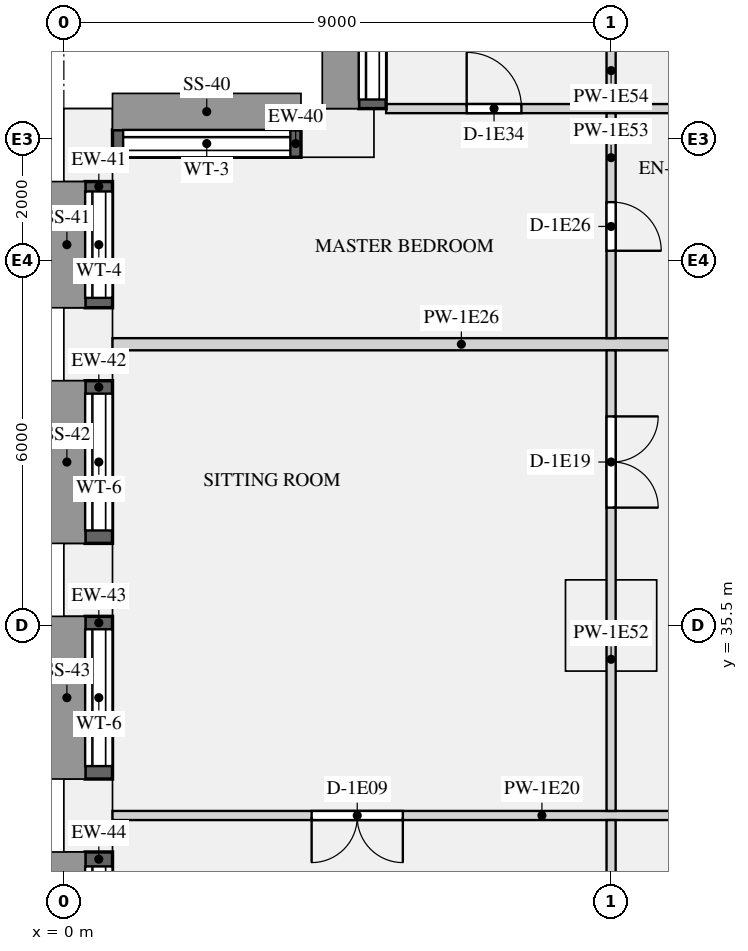
"""IFC4 building model, lengths in metres.
Left out: names, types, materials, properties, quantities, classifications, styles, units other than length and angle.
Written with IfcOpenShell. Run it as: python <this file> out.ifc"""

import sys

from ifc_helpers import new_model, si_unit, direction, frame, frame_2d, origin, origin_2d, place, context, subcontext, project, spatial, rectangle, extrude, element, fill, save


model = new_model("IFC4")
c1 = context("Model", 3, precision=1e-05, world=origin(), true_north=direction((0.0, 1.0)))
c2 = subcontext(c1, "Body", "Model", "MODEL_VIEW")
j1 = project(units=[si_unit("LENGTHUNIT", "METRE"), si_unit("PLANEANGLEUNIT", "RADIAN")], contexts=[c1])
p1 = place(None, origin())
s1 = spatial("IfcSite", under=j1, at=p1, CompositionType="ELEMENT")
p2 = place(p1, origin())
s2 = spatial("IfcBuilding", under=s1, at=p2, CompositionType="ELEMENT")
p3 = place(p2, frame((0.0, 0.0, 54.15)))
s3 = spatial("IfcBuildingStorey", under=s2, at=p3, CompositionType="ELEMENT", Elevation=54.15)
for number, where, z_axis, x_axis in (
    (1, (4.5, 43.6, 0.0), (0.0, 0.0, 1.0), (-1.0, 0.0, 0.0)),
    (2, (0.4, 43.4, 0.0), (0.0, 0.0, 1.0), (0.0, -1.0, 0.0)),
    (3, (0.4, 40.125, 0.0), (0.0, 0.0, 1.0), (0.0, -1.0, 0.0)),
    (4, (0.4, 36.25, 0.0), (0.0, 0.0, 1.0), (0.0, -1.0, 0.0)),
    (5, (0.4, 32.375, 0.0), (0.0, 0.0, 1.0), (0.0, -1.0, 0.0)),
):
    element("IfcColumn", number, at=place(p3, frame(where, z_axis=z_axis, x_axis=x_axis)), inside=s3, PredefinedType="USERDEFINED", context=c2, shape_type="SweptSolid", body=[
        extrude(rectangle(XDim=1.2, YDim=0.8, at=origin_2d()), origin(), (0.0, 0.0, 1.0), 3.15),
    ])
p4 = place(p3, frame((9.0, 35.5, 0.0), z_axis=(0.0, 0.0, 1.0), x_axis=(1.0, 0.0, 0.0)))
e6 = element("IfcColumn", 6, at=p4, inside=s3, PredefinedType="COLUMN", context=c2, shape_type="SweptSolid", body=[
    extrude(rectangle(XDim=1.5, YDim=1.5, at=origin_2d()), origin(), (0.0, 0.0, 1.0), 3.15),
])
p5 = place(p3, frame((5.075, 47.3, 0.9), z_axis=(0.0, 0.0, 1.0), x_axis=(0.0, -1.0, 0.0)))
e7 = element("IfcWall", 7, at=p5, inside=s3, PredefinedType="SOLIDWALL", context=c2, shape_type="SweptSolid", body=[
    extrude(rectangle(XDim=3.3, YDim=0.45, at=frame_2d((1.65, 0.0))), origin(), (0.0, 0.0, 1.0), 1.93),
])
p6 = place(p5, frame((0.15, 0.0, 0.15)))
e8 = element("IfcOpeningElement", 8, at=p6, cuts=e7, PredefinedType="OPENING", context=c2, shape_type="SweptSolid", body=[
    extrude(rectangle(XDim=3.0, YDim=1.5, at=frame_2d((1.5, 0.75))), frame((0.0, 0.235, 0.0), z_axis=(0.0, -1.0, 0.0), x_axis=(1.0, 0.0, 0.0)), (0.0, 0.0, 1.0), 0.47),
])
p7 = place(p3, frame((3.9, 43.425, 0.9), z_axis=(0.0, 0.0, 1.0), x_axis=(-1.0, 0.0, 0.0)))
e9 = element("IfcWall", 9, at=p7, inside=s3, PredefinedType="SOLIDWALL", context=c2, shape_type="SweptSolid", body=[
    extrude(rectangle(XDim=3.1, YDim=0.45, at=frame_2d((1.55, 0.0))), origin(), (0.0, 0.0, 1.0), 1.93),
])
p8 = place(p7, frame((0.175, 0.0, 0.15)))
e10 = element("IfcOpeningElement", 10, at=p8, cuts=e9, PredefinedType="OPENING", context=c2, shape_type="SweptSolid", body=[
    extrude(rectangle(XDim=2.75, YDim=1.5, at=frame_2d((1.375, 0.75))), frame((0.0, 0.235, 0.0), z_axis=(0.0, -1.0, 0.0), x_axis=(1.0, 0.0, 0.0)), (0.0, 0.0, 1.0), 0.47),
])
p9 = place(p3, frame((0.575, 42.8, 0.9), z_axis=(0.0, 0.0, 1.0), x_axis=(0.0, -1.0, 0.0)))
e11 = element("IfcWall", 11, at=p9, inside=s3, PredefinedType="SOLIDWALL", context=c2, shape_type="SweptSolid", body=[
    extrude(rectangle(XDim=2.075, YDim=0.45, at=frame_2d((1.038, 0.0))), origin(), (0.0, 0.0, 1.0), 1.93),
])
p10 = place(p9, frame((0.163, 0.0, 0.15)))
e12 = element("IfcOpeningElement", 12, at=p10, cuts=e11, PredefinedType="OPENING", context=c2, shape_type="SweptSolid", body=[
    extrude(rectangle(XDim=1.75, YDim=1.5, at=frame_2d((0.875, 0.75))), frame((0.0, 0.235, 0.0), z_axis=(0.0, -1.0, 0.0), x_axis=(1.0, 0.0, 0.0)), (0.0, 0.0, 1.0), 0.47),
])
p11 = place(p3, frame((0.575, 39.525, 0.9), z_axis=(0.0, 0.0, 1.0), x_axis=(0.0, -1.0, 0.0)))
e13 = element("IfcWall", 13, at=p11, inside=s3, PredefinedType="SOLIDWALL", context=c2, shape_type="SweptSolid", body=[
    extrude(rectangle(XDim=2.675, YDim=0.45, at=frame_2d((1.337, 0.0))), origin(), (0.0, 0.0, 1.0), 1.93),
])
p12 = place(p11, frame((0.212, 0.0, 0.15)))
e14 = element("IfcOpeningElement", 14, at=p12, cuts=e13, PredefinedType="OPENING", context=c2, shape_type="SweptSolid", body=[
    extrude(rectangle(XDim=2.25, YDim=1.5, at=frame_2d((1.125, 0.75))), frame((0.0, 0.235, 0.0), z_axis=(0.0, -1.0, 0.0), x_axis=(1.0, 0.0, 0.0)), (0.0, 0.0, 1.0), 0.47),
])
p13 = place(p3, frame((0.575, 35.65, 0.9), z_axis=(0.0, 0.0, 1.0), x_axis=(0.0, -1.0, 0.0)))
e15 = element("IfcWall", 15, at=p13, inside=s3, PredefinedType="SOLIDWALL", context=c2, shape_type="SweptSolid", body=[
    extrude(rectangle(XDim=2.675, YDim=0.45, at=frame_2d((1.337, 0.0))), origin(), (0.0, 0.0, 1.0), 1.93),
])
p14 = place(p13, frame((0.212, 0.0, 0.15)))
e16 = element("IfcOpeningElement", 16, at=p14, cuts=e15, PredefinedType="OPENING", context=c2, shape_type="SweptSolid", body=[
    extrude(rectangle(XDim=2.25, YDim=1.5, at=frame_2d((1.125, 0.75))), frame((0.0, 0.235, 0.0), z_axis=(0.0, -1.0, 0.0), x_axis=(1.0, 0.0, 0.0)), (0.0, 0.0, 1.0), 0.47),
])
p15 = place(p3, frame((0.575, 31.775, 0.9), z_axis=(0.0, 0.0, 1.0), x_axis=(0.0, -1.0, 0.0)))
e17 = element("IfcWall", 17, at=p15, inside=s3, PredefinedType="SOLIDWALL", context=c2, shape_type="SweptSolid", body=[
    extrude(rectangle(XDim=2.475, YDim=0.45, at=frame_2d((1.237, 0.0))), origin(), (0.0, 0.0, 1.0), 1.93),
])
p16 = place(p15, frame((0.238, 0.0, 0.15)))
e18 = element("IfcOpeningElement", 18, at=p16, cuts=e17, PredefinedType="OPENING", context=c2, shape_type="SweptSolid", body=[
    extrude(rectangle(XDim=2.0, YDim=1.5, at=frame_2d((1.0, 0.75))), frame((0.0, 0.235, 0.0), z_axis=(0.0, -1.0, 0.0), x_axis=(1.0, 0.0, 0.0)), (0.0, 0.0, 1.0), 0.47),
])
p17 = place(p3, frame((0.8, 32.375, 0.0), z_axis=(0.0, 0.0, 1.0), x_axis=(1.0, 0.0, 0.0)))
e19 = element("IfcWall", 19, at=p17, inside=s3, PredefinedType="PARTITIONING", context=c2, shape_type="SweptSolid", body=[
    extrude(rectangle(XDim=11.4, YDim=0.15, at=frame_2d((5.7, 0.0))), origin(), (0.0, 0.0, 1.0), 2.83),
])
p18 = place(p17, frame((3.275, 0.0, 0.0)))
e20 = element("IfcOpeningElement", 20, at=p18, cuts=e19, PredefinedType="OPENING", context=c2, shape_type="SweptSolid", body=[
    extrude(rectangle(XDim=1.5, YDim=2.1, at=frame_2d((0.75, 1.05))), frame((0.0, 0.085, 0.0), z_axis=(0.0, -1.0, 0.0), x_axis=(1.0, 0.0, 0.0)), (0.0, 0.0, 1.0), 0.17),
])
p19 = place(p17, frame((9.35, 0.0, 0.0)))
e21 = element("IfcOpeningElement", 21, at=p19, cuts=e19, PredefinedType="OPENING", context=c2, shape_type="SweptSolid", body=[
    extrude(rectangle(XDim=0.9, YDim=2.1, at=frame_2d((0.45, 1.05))), frame((0.0, 0.085, 0.0), z_axis=(0.0, -1.0, 0.0), x_axis=(1.0, 0.0, 0.0)), (0.0, 0.0, 1.0), 0.17),
])
p20 = place(p3, frame((0.8, 40.125, 0.0), z_axis=(0.0, 0.0, 1.0), x_axis=(1.0, 0.0, 0.0)))
e22 = element("IfcWall", 22, at=p20, inside=s3, PredefinedType="PARTITIONING", context=c2, shape_type="SweptSolid", body=[
    extrude(rectangle(XDim=11.475, YDim=0.2, at=frame_2d((5.737, 0.0))), origin(), (0.0, 0.0, 1.0), 2.83),
])
p21 = place(p3, frame((5.3, 44.0, 0.0), z_axis=(0.0, 0.0, 1.0), x_axis=(1.0, 0.0, 0.0)))
e23 = element("IfcWall", 23, at=p21, inside=s3, PredefinedType="PARTITIONING", context=c2, shape_type="SweptSolid", body=[
    extrude(rectangle(XDim=27.775, YDim=0.15, at=frame_2d((13.887, 0.0))), origin(), (0.0, 0.0, 1.0), 2.83),
])
p22 = place(p21, frame((14.5, 0.0, 0.0)))
e24 = element("IfcOpeningElement", 24, at=p22, cuts=e23, PredefinedType="OPENING", context=c2, shape_type="SweptSolid", body=[
    extrude(rectangle(XDim=0.9, YDim=2.1, at=frame_2d((0.45, 1.05))), frame((0.0, 0.085, 0.0), z_axis=(0.0, -1.0, 0.0), x_axis=(1.0, 0.0, 0.0)), (0.0, 0.0, 1.0), 0.17),
])
p23 = place(p21, frame((19.0, 0.0, 0.0)))
e25 = element("IfcOpeningElement", 25, at=p23, cuts=e23, PredefinedType="OPENING", context=c2, shape_type="SweptSolid", body=[
    extrude(rectangle(XDim=0.9, YDim=2.1, at=frame_2d((0.45, 1.05))), frame((0.0, 0.085, 0.0), z_axis=(0.0, -1.0, 0.0), x_axis=(1.0, 0.0, 0.0)), (0.0, 0.0, 1.0), 0.17),
])
p24 = place(p21, frame((9.35, 0.0, 0.0)))
e26 = element("IfcOpeningElement", 26, at=p24, cuts=e23, PredefinedType="OPENING", context=c2, shape_type="SweptSolid", body=[
    extrude(rectangle(XDim=0.9, YDim=2.1, at=frame_2d((0.45, 1.05))), frame((0.0, 0.085, 0.0), z_axis=(0.0, -1.0, 0.0), x_axis=(1.0, 0.0, 0.0)), (0.0, 0.0, 1.0), 0.17),
])
p25 = place(p21, frame((23.5, 0.0, 0.0)))
e27 = element("IfcOpeningElement", 27, at=p25, cuts=e23, PredefinedType="OPENING", context=c2, shape_type="SweptSolid", body=[
    extrude(rectangle(XDim=0.9, YDim=2.1, at=frame_2d((0.45, 1.05))), frame((0.0, 0.085, 0.0), z_axis=(0.0, -1.0, 0.0), x_axis=(1.0, 0.0, 0.0)), (0.0, 0.0, 1.0), 0.17),
])
p26 = place(p21, frame((1.325, 0.0, 0.0)))
e28 = element("IfcOpeningElement", 28, at=p26, cuts=e23, PredefinedType="OPENING", context=c2, shape_type="SweptSolid", body=[
    extrude(rectangle(XDim=0.9, YDim=2.1, at=frame_2d((0.45, 1.05))), frame((0.0, 0.085, 0.0), z_axis=(0.0, -1.0, 0.0), x_axis=(1.0, 0.0, 0.0)), (0.0, 0.0, 1.0), 0.17),
])
p27 = place(p3, frame((9.0, 24.075, 0.0), z_axis=(0.0, 0.0, 1.0), x_axis=(0.0, 1.0, 0.0)))
e29 = element("IfcWall", 29, at=p27, inside=s3, PredefinedType="PARTITIONING", context=c2, shape_type="SweptSolid", body=[
    extrude(rectangle(XDim=8.225, YDim=0.15, at=frame_2d((4.113, 0.0))), origin(), (0.0, 0.0, 1.0), 2.83),
])
p28 = place(p27, frame((2.1, 0.0, 0.0)))
e30 = element("IfcOpeningElement", 30, at=p28, cuts=e29, PredefinedType="OPENING", context=c2, shape_type="SweptSolid", body=[
    extrude(rectangle(XDim=0.9, YDim=2.1, at=frame_2d((0.45, 1.05))), frame((0.0, 0.085, 0.0), z_axis=(0.0, -1.0, 0.0), x_axis=(1.0, 0.0, 0.0)), (0.0, 0.0, 1.0), 0.17),
])
p29 = place(p3, frame((9.0, 32.45, 0.0), z_axis=(0.0, 0.0, 1.0), x_axis=(0.0, 1.0, 0.0)))
e31 = element("IfcWall", 31, at=p29, inside=s3, PredefinedType="PARTITIONING", context=c2, shape_type="SweptSolid", body=[
    extrude(rectangle(XDim=7.575, YDim=0.15, at=frame_2d((3.788, 0.0))), origin(), (0.0, 0.0, 1.0), 2.83),
])
p30 = place(p29, frame((4.988, 0.0, 0.0)))
e32 = element("IfcOpeningElement", 32, at=p30, cuts=e31, PredefinedType="OPENING", context=c2, shape_type="SweptSolid", body=[
    extrude(rectangle(XDim=1.5, YDim=2.1, at=frame_2d((0.75, 1.05))), frame((0.0, 0.085, 0.0), z_axis=(0.0, -1.0, 0.0), x_axis=(1.0, 0.0, 0.0)), (0.0, 0.0, 1.0), 0.17),
])
p31 = place(p3, frame((9.0, 40.225, 0.0), z_axis=(0.0, 0.0, 1.0), x_axis=(0.0, 1.0, 0.0)))
e33 = element("IfcWall", 33, at=p31, inside=s3, PredefinedType="PARTITIONING", context=c2, shape_type="SweptSolid", body=[
    extrude(rectangle(XDim=3.7, YDim=0.15, at=frame_2d((1.85, 0.0))), origin(), (0.0, 0.0, 1.0), 2.83),
])
p32 = place(p31, frame((1.437, 0.0, 0.0)))
e34 = element("IfcOpeningElement", 34, at=p32, cuts=e33, PredefinedType="OPENING", context=c2, shape_type="SweptSolid", body=[
    extrude(rectangle(XDim=0.8, YDim=2.1, at=frame_2d((0.4, 1.05))), frame((0.0, 0.085, 0.0), z_axis=(0.0, -1.0, 0.0), x_axis=(1.0, 0.0, 0.0)), (0.0, 0.0, 1.0), 0.17),
])
p33 = place(p3, frame((9.0, 44.075, 0.0), z_axis=(0.0, 0.0, 1.0), x_axis=(0.0, 1.0, 0.0)))
e35 = element("IfcWall", 35, at=p33, inside=s3, PredefinedType="PARTITIONING", context=c2, shape_type="SweptSolid", body=[
    extrude(rectangle(XDim=3.625, YDim=0.15, at=frame_2d((1.812, 0.0))), origin(), (0.0, 0.0, 1.0), 2.83),
])
p34 = place(p33, frame((1.1, 0.0, 0.0)))
e36 = element("IfcOpeningElement", 36, at=p34, cuts=e35, PredefinedType="OPENING", context=c2, shape_type="SweptSolid", body=[
    extrude(rectangle(XDim=1.5, YDim=2.1, at=frame_2d((0.75, 1.05))), frame((0.0, 0.085, 0.0), z_axis=(0.0, -1.0, 0.0), x_axis=(1.0, 0.0, 0.0)), (0.0, 0.0, 1.0), 0.17),
])
p35 = place(p6, origin())
e37 = element("IfcWindow", 37, at=p35, inside=s3, PartitioningType="SINGLE_PANEL", PredefinedType="WINDOW", context=c2, shape_type="SweptSolid", body=[
    extrude(rectangle(XDim=3.0, YDim=1.5, at=frame_2d((1.5, 0.75))), frame((0.0, -0.065, 0.0), z_axis=(0.0, -1.0, 0.0), x_axis=(1.0, 0.0, 0.0)), (0.0, 0.0, 1.0), 0.06),
])
fill(e8, e37)
p36 = place(p8, origin())
e38 = element("IfcWindow", 38, at=p36, inside=s3, PartitioningType="SINGLE_PANEL", PredefinedType="WINDOW", context=c2, shape_type="SweptSolid", body=[
    extrude(rectangle(XDim=2.75, YDim=1.5, at=frame_2d((1.375, 0.75))), frame((0.0, -0.065, 0.0), z_axis=(0.0, -1.0, 0.0), x_axis=(1.0, 0.0, 0.0)), (0.0, 0.0, 1.0), 0.06),
])
fill(e10, e38)
p37 = place(p10, origin())
e39 = element("IfcWindow", 39, at=p37, inside=s3, PartitioningType="SINGLE_PANEL", PredefinedType="WINDOW", context=c2, shape_type="SweptSolid", body=[
    extrude(rectangle(XDim=1.75, YDim=1.5, at=frame_2d((0.875, 0.75))), frame((0.0, -0.065, 0.0), z_axis=(0.0, -1.0, 0.0), x_axis=(1.0, 0.0, 0.0)), (0.0, 0.0, 1.0), 0.06),
])
fill(e12, e39)
p38 = place(p12, origin())
e40 = element("IfcWindow", 40, at=p38, inside=s3, PartitioningType="SINGLE_PANEL", PredefinedType="WINDOW", context=c2, shape_type="SweptSolid", body=[
    extrude(rectangle(XDim=2.25, YDim=1.5, at=frame_2d((1.125, 0.75))), frame((0.0, -0.065, 0.0), z_axis=(0.0, -1.0, 0.0), x_axis=(1.0, 0.0, 0.0)), (0.0, 0.0, 1.0), 0.06),
])
fill(e14, e40)
p39 = place(p14, origin())
e41 = element("IfcWindow", 41, at=p39, inside=s3, PartitioningType="SINGLE_PANEL", PredefinedType="WINDOW", context=c2, shape_type="SweptSolid", body=[
    extrude(rectangle(XDim=2.25, YDim=1.5, at=frame_2d((1.125, 0.75))), frame((0.0, -0.065, 0.0), z_axis=(0.0, -1.0, 0.0), x_axis=(1.0, 0.0, 0.0)), (0.0, 0.0, 1.0), 0.06),
])
fill(e16, e41)
p40 = place(p16, origin())
e42 = element("IfcWindow", 42, at=p40, inside=s3, PartitioningType="SINGLE_PANEL", PredefinedType="WINDOW", context=c2, shape_type="SweptSolid", body=[
    extrude(rectangle(XDim=2.0, YDim=1.5, at=frame_2d((1.0, 0.75))), frame((0.0, -0.065, 0.0), z_axis=(0.0, -1.0, 0.0), x_axis=(1.0, 0.0, 0.0)), (0.0, 0.0, 1.0), 0.06),
])
fill(e18, e42)
p41 = place(p18, frame((1.5, 0.0, 0.0), z_axis=(0.0, 0.0, 1.0), x_axis=(-1.0, 0.0, 0.0)))
e43 = element("IfcDoor", 43, at=p41, inside=s3, OperationType="DOUBLE_DOOR_SINGLE_SWING", PredefinedType="DOOR", context=c2, shape_type="SweptSolid", body=[
    extrude(rectangle(XDim=1.5, YDim=2.1, at=frame_2d((0.75, 1.05))), frame((0.0, 0.025, 0.0), z_axis=(0.0, -1.0, 0.0), x_axis=(1.0, 0.0, 0.0)), (0.0, 0.0, 1.0), 0.05),
])
fill(e20, e43)
p42 = place(p30, frame((1.5, 0.0, 0.0), z_axis=(0.0, 0.0, 1.0), x_axis=(-1.0, 0.0, 0.0)))
e44 = element("IfcDoor", 44, at=p42, inside=s3, OperationType="DOUBLE_DOOR_SINGLE_SWING", PredefinedType="DOOR", context=c2, shape_type="SweptSolid", body=[
    extrude(rectangle(XDim=1.5, YDim=2.1, at=frame_2d((0.75, 1.05))), frame((0.0, 0.025, 0.0), z_axis=(0.0, -1.0, 0.0), x_axis=(1.0, 0.0, 0.0)), (0.0, 0.0, 1.0), 0.05),
])
fill(e32, e44)
p43 = place(p32, frame((0.8, 0.0, 0.0), z_axis=(0.0, 0.0, 1.0), x_axis=(-1.0, 0.0, 0.0)))
e45 = element("IfcDoor", 45, at=p43, inside=s3, OperationType="SINGLE_SWING_RIGHT", PredefinedType="DOOR", context=c2, shape_type="SweptSolid", body=[
    extrude(rectangle(XDim=0.8, YDim=2.1, at=frame_2d((0.4, 1.05))), frame((0.0, 0.025, 0.0), z_axis=(0.0, -1.0, 0.0), x_axis=(1.0, 0.0, 0.0)), (0.0, 0.0, 1.0), 0.05),
])
fill(e34, e45)
p44 = place(p26, origin())
e46 = element("IfcDoor", 46, at=p44, inside=s3, OperationType="SINGLE_SWING_LEFT", PredefinedType="DOOR", context=c2, shape_type="SweptSolid", body=[
    extrude(rectangle(XDim=0.9, YDim=2.1, at=frame_2d((0.45, 1.05))), frame((0.0, 0.025, 0.0), z_axis=(0.0, -1.0, 0.0), x_axis=(1.0, 0.0, 0.0)), (0.0, 0.0, 1.0), 0.05),
])
fill(e28, e46)
save(model, sys.argv[1])
